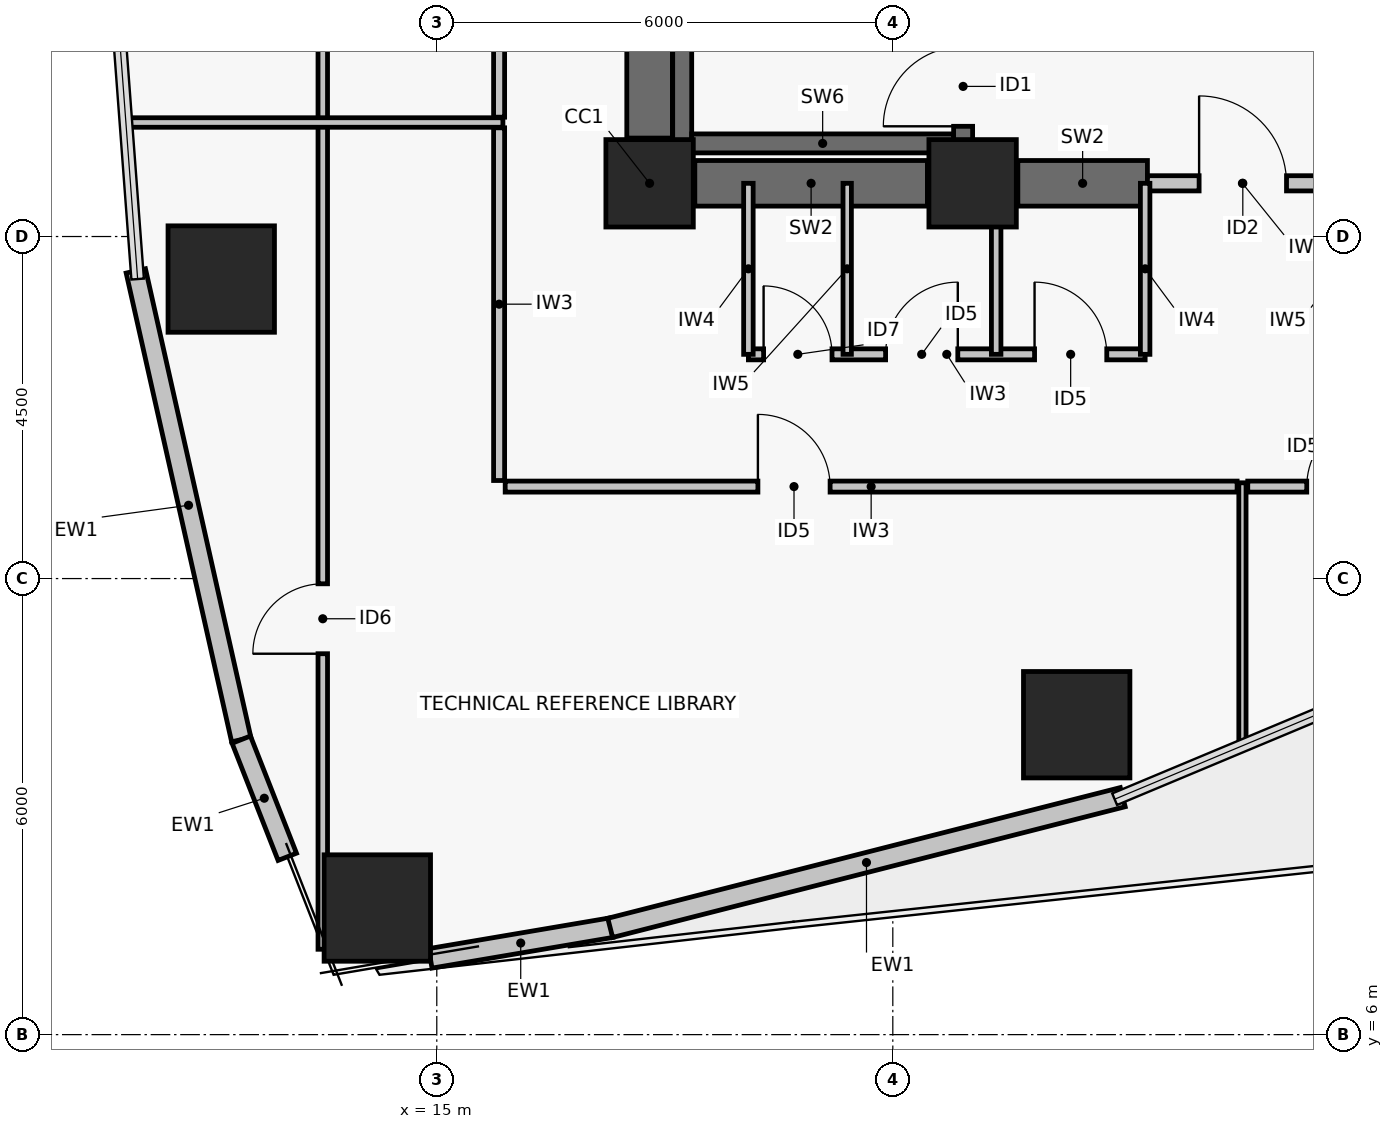
"""IFC4 building model, lengths in metres.
Left out: names, types, materials, properties, quantities, classifications, styles, units other than length and angle.
Written with IfcOpenShell. Run it as: python <this file> out.ifc"""

import sys

from ifc_helpers import new_model, si_unit, direction, frame, frame_2d, origin, origin_2d, place, context, subcontext, project, spatial, rectangle, hollow_rectangle, extrude, element, fill, save


model = new_model("IFC4")
c1 = context("Model", 3, precision=1e-05, world=origin(), true_north=direction((0.0, 1.0)))
c2 = subcontext(c1, "Body", "Model", "MODEL_VIEW")
j1 = project(units=[si_unit("LENGTHUNIT", "METRE"), si_unit("PLANEANGLEUNIT", "RADIAN")], contexts=[c1])
p1 = place(None, origin())
s1 = spatial("IfcSite", under=j1, at=p1, CompositionType="ELEMENT")
p2 = place(p1, origin())
s2 = spatial("IfcBuilding", under=s1, at=p2, CompositionType="ELEMENT")
p3 = place(p2, frame((0.0, 0.0, 68.52)))
s3 = spatial("IfcBuildingStorey", under=s2, at=p3, CompositionType="ELEMENT", Elevation=68.52)
for number, where, z_axis, x_axis in (
    (1, (17.8, 17.2, 0.0), (0.0, 0.0, 1.0), (1.0, 0.0, 0.0)),
    (2, (22.05, 17.2, 0.0), (0.0, 0.0, 1.0), (1.0, 0.0, 0.0)),
):
    element("IfcColumn", number, at=place(p3, frame(where, z_axis=z_axis, x_axis=x_axis)), inside=s3, PredefinedType="COLUMN", context=c2, shape_type="SweptSolid", body=[
        extrude(rectangle(XDim=1.15, YDim=1.15, at=origin_2d()), origin(), (0.0, 0.0, 1.0), 3.72),
    ])
p4 = place(p3, frame((18.395, 17.2, 0.0), z_axis=(0.0, 0.0, 1.0), x_axis=(1.0, 0.0, 0.0)))
e3 = element("IfcWall", 3, at=p4, inside=s3, PredefinedType="SHEAR", context=c2, shape_type="SweptSolid", body=[
    extrude(rectangle(XDim=3.06, YDim=0.6, at=frame_2d((1.53, 0.0))), origin(), (0.0, 0.0, 1.0), 3.47),
])
p5 = place(p3, frame((22.645, 17.2, 0.0), z_axis=(0.0, 0.0, 1.0), x_axis=(1.0, 0.0, 0.0)))
e4 = element("IfcWall", 4, at=p5, inside=s3, PredefinedType="SHEAR", context=c2, shape_type="SweptSolid", body=[
    extrude(rectangle(XDim=1.705, YDim=0.6, at=frame_2d((0.853, 0.0))), origin(), (0.0, 0.0, 1.0), 3.47),
])
p6 = place(p3, frame((17.8, 17.795, 0.0), z_axis=(0.0, 0.0, 1.0), x_axis=(0.0, 1.0, 0.0)))
e5 = element("IfcWall", 5, at=p6, inside=s3, PredefinedType="SHEAR", context=c2, shape_type="SweptSolid", body=[
    extrude(rectangle(XDim=8.41, YDim=0.6, at=frame_2d((4.205, 0.0))), origin(), (0.0, 0.0, 1.0), 3.47),
])
p7 = place(p3, frame((18.229, 17.6, 0.0), z_axis=(0.0, 0.0, 1.0), x_axis=(0.0, 1.0, 0.0)))
e6 = element("IfcWall", 6, at=p7, inside=s3, PredefinedType="SHEAR", context=c2, shape_type="SweptSolid", body=[
    extrude(rectangle(XDim=8.8, YDim=0.25, at=frame_2d((4.4, 0.0))), origin(), (0.0, 0.0, 1.0), 3.47),
])
p8 = place(p3, frame((21.925, 17.6, 0.0), z_axis=(0.0, 0.0, 1.0), x_axis=(0.0, 1.0, 0.0)))
e7 = element("IfcWall", 7, at=p8, inside=s3, PredefinedType="SHEAR", context=c2, shape_type="SweptSolid", body=[
    extrude(rectangle(XDim=8.8, YDim=0.25, at=frame_2d((4.4, 0.0))), origin(), (0.0, 0.0, 1.0), 3.47),
])
p9 = place(p8, frame((0.35, 0.0, 0.0)))
e8 = element("IfcOpeningElement", 8, at=p9, cuts=e7, PredefinedType="OPENING", context=c2, shape_type="SweptSolid", body=[
    extrude(rectangle(XDim=1.05, YDim=2.08, at=frame_2d((0.525, 1.04))), frame((0.0, 0.135, 0.0), z_axis=(0.0, -1.0, 0.0), x_axis=(1.0, 0.0, 0.0)), (0.0, 0.0, 1.0), 0.27),
])
p10 = place(p3, frame((18.354, 17.725, 0.0), z_axis=(0.0, 0.0, 1.0), x_axis=(1.0, 0.0, 0.0)))
e9 = element("IfcWall", 9, at=p10, inside=s3, PredefinedType="SHEAR", context=c2, shape_type="SweptSolid", body=[
    extrude(rectangle(XDim=3.446, YDim=0.25, at=frame_2d((1.723, 0.0))), origin(), (0.0, 0.0, 1.0), 3.47),
])
for number, where, z_axis, x_axis in (
    (10, (12.164, 15.94, 0.0), (0.0, 0.0, 1.0), (1.0, 0.0, 0.0)),
    (11, (14.218, 7.666, 0.0), (0.0, 0.0, 1.0), (1.0, 0.0, 0.0)),
    (12, (23.419, 10.077, 0.0), (0.0, 0.0, 1.0), (1.0, 0.0, 0.0)),
):
    element("IfcColumn", number, at=place(p3, frame(where, z_axis=z_axis, x_axis=x_axis)), inside=s3, PredefinedType="COLUMN", context=c2, shape_type="SweptSolid", body=[
        extrude(hollow_rectangle(XDim=1.4, YDim=1.4, WallThickness=0.055, at=origin_2d()), origin(), (0.0, 0.0, 1.0), 3.72),
    ])
p11 = place(p3, frame((12.427, 9.881, 0.0), z_axis=(0.0, 0.0, 1.0), x_axis=(-0.219502085231, 0.975612030768, 0.0)))
e13 = element("IfcWall", 13, at=p11, inside=s3, PredefinedType="PARTITIONING", context=c2, shape_type="SweptSolid", body=[
    extrude(rectangle(XDim=6.321, YDim=0.26, at=frame_2d((3.16, 0.0))), origin(), (0.0, 0.0, 1.0), 3.47),
])
p12 = place(p3, frame((13.033, 8.339, 0.0), z_axis=(0.0, 0.0, 1.0), x_axis=(-0.365666052462, 0.930746119023, 0.0)))
e14 = element("IfcWall", 14, at=p12, inside=s3, PredefinedType="PARTITIONING", context=c2, shape_type="SweptSolid", body=[
    extrude(rectangle(XDim=1.656, YDim=0.26, at=frame_2d((0.828, 0.0))), origin(), (0.0, 0.0, 1.0), 3.47),
])
p13 = place(p3, frame((17.293, 7.407, 0.0), z_axis=(0.0, 0.0, 1.0), x_axis=(-0.985905469923, -0.167303330437, 0.0)))
e15 = element("IfcWall", 15, at=p13, inside=s3, PredefinedType="PARTITIONING", context=c2, shape_type="SweptSolid", body=[
    extrude(rectangle(XDim=2.412, YDim=0.26, at=frame_2d((1.206, 0.0))), origin(), (0.0, 0.0, 1.0), 3.47),
])
p14 = place(p3, frame((24.025, 9.124, 0.0), z_axis=(0.0, 0.0, 1.0), x_axis=(-0.968977974408, -0.247147092057, 0.0)))
e16 = element("IfcWall", 16, at=p14, inside=s3, PredefinedType="PARTITIONING", context=c2, shape_type="SweptSolid", body=[
    extrude(rectangle(XDim=6.959, YDim=0.26, at=frame_2d((3.479, 0.0))), origin(), (0.0, 0.0, 1.0), 3.47),
])
p15 = place(p3, frame((24.35, 17.2, 0.0), z_axis=(0.0, 0.0, 1.0), x_axis=(1.0, 0.0, 0.0)))
e17 = element("IfcWall", 17, at=p15, inside=s3, PredefinedType="PARTITIONING", context=c2, shape_type="SweptSolid", body=[
    extrude(rectangle(XDim=2.5, YDim=0.2, at=frame_2d((1.25, 0.0))), origin(), (0.0, 0.0, 1.0), 2.6),
])
p16 = place(p15, frame((0.68, 0.0, 0.0)))
e18 = element("IfcOpeningElement", 18, at=p16, cuts=e17, PredefinedType="OPENING", context=c2, shape_type="SweptSolid", body=[
    extrude(rectangle(XDim=1.15, YDim=2.08, at=frame_2d((0.575, 1.04))), frame((0.0, 0.11, 0.0), z_axis=(0.0, -1.0, 0.0), x_axis=(1.0, 0.0, 0.0)), (0.0, 0.0, 1.0), 0.22),
])
p17 = place(p3, frame((19.1, 14.95, 0.0), z_axis=(0.0, 0.0, 1.0), x_axis=(1.0, 0.0, 0.0)))
e19 = element("IfcWall", 19, at=p17, inside=s3, PredefinedType="PARTITIONING", context=c2, shape_type="SweptSolid", body=[
    extrude(rectangle(XDim=5.22, YDim=0.145, at=frame_2d((2.61, 0.0))), origin(), (0.0, 0.0, 1.0), 2.2),
])
p18 = place(p17, frame((0.2, 0.0, 0.0)))
e20 = element("IfcOpeningElement", 20, at=p18, cuts=e19, PredefinedType="OPENING", context=c2, shape_type="SweptSolid", body=[
    extrude(rectangle(XDim=0.9, YDim=2.02, at=frame_2d((0.45, 1.01))), frame((0.0, 0.083, 0.0), z_axis=(0.0, -1.0, 0.0), x_axis=(1.0, 0.0, 0.0)), (0.0, 0.0, 1.0), 0.165),
])
p19 = place(p17, frame((1.805, 0.0, 0.0)))
e21 = element("IfcOpeningElement", 21, at=p19, cuts=e19, PredefinedType="OPENING", context=c2, shape_type="SweptSolid", body=[
    extrude(rectangle(XDim=0.95, YDim=2.06, at=frame_2d((0.475, 1.03))), frame((0.0, 0.083, 0.0), z_axis=(0.0, -1.0, 0.0), x_axis=(1.0, 0.0, 0.0)), (0.0, 0.0, 1.0), 0.165),
])
p20 = place(p17, frame((3.765, 0.0, 0.0)))
e22 = element("IfcOpeningElement", 22, at=p20, cuts=e19, PredefinedType="OPENING", context=c2, shape_type="SweptSolid", body=[
    extrude(rectangle(XDim=0.95, YDim=2.06, at=frame_2d((0.475, 1.03))), frame((0.0, 0.083, 0.0), z_axis=(0.0, -1.0, 0.0), x_axis=(1.0, 0.0, 0.0)), (0.0, 0.0, 1.0), 0.165),
])
p21 = place(p3, frame((19.1, 14.95, 0.0), z_axis=(0.0, 0.0, 1.0), x_axis=(0.0, 1.0, 0.0)))
e23 = element("IfcWall", 23, at=p21, inside=s3, PredefinedType="PARTITIONING", context=c2, shape_type="SweptSolid", body=[
    extrude(rectangle(XDim=2.25, YDim=0.125, at=frame_2d((1.125, 0.0))), origin(), (0.0, 0.0, 1.0), 2.6),
])
p22 = place(p3, frame((20.4, 14.95, 0.0), z_axis=(0.0, 0.0, 1.0), x_axis=(0.0, 1.0, 0.0)))
e24 = element("IfcWall", 24, at=p22, inside=s3, PredefinedType="PARTITIONING", context=c2, shape_type="SweptSolid", body=[
    extrude(rectangle(XDim=2.25, YDim=0.11, at=frame_2d((1.125, 0.0))), origin(), (0.0, 0.0, 1.0), 2.6),
])
p23 = place(p3, frame((22.36, 14.95, 0.0), z_axis=(0.0, 0.0, 1.0), x_axis=(0.0, 1.0, 0.0)))
e25 = element("IfcWall", 25, at=p23, inside=s3, PredefinedType="PARTITIONING", context=c2, shape_type="SweptSolid", body=[
    extrude(rectangle(XDim=2.25, YDim=0.125, at=frame_2d((1.125, 0.0))), origin(), (0.0, 0.0, 1.0), 2.2),
])
p24 = place(p3, frame((24.32, 14.95, 0.0), z_axis=(0.0, 0.0, 1.0), x_axis=(0.0, 1.0, 0.0)))
e26 = element("IfcWall", 26, at=p24, inside=s3, PredefinedType="PARTITIONING", context=c2, shape_type="SweptSolid", body=[
    extrude(rectangle(XDim=2.25, YDim=0.125, at=frame_2d((1.125, 0.0))), origin(), (0.0, 0.0, 1.0), 2.6),
])
p25 = place(p3, frame((15.82, 17.93, 0.0), z_axis=(0.0, 0.0, 1.0), x_axis=(0.0, -1.0, 0.0)))
e27 = element("IfcWall", 27, at=p25, inside=s3, PredefinedType="PARTITIONING", context=c2, shape_type="SweptSolid", body=[
    extrude(rectangle(XDim=4.64, YDim=0.145, at=frame_2d((2.32, 0.0))), origin(), (0.0, 0.0, 1.0), 2.2),
])
p26 = place(p3, frame((15.9, 13.21, 0.0), z_axis=(0.0, 0.0, 1.0), x_axis=(1.0, 0.0, 0.0)))
e28 = element("IfcWall", 28, at=p26, inside=s3, PredefinedType="PARTITIONING", context=c2, shape_type="SweptSolid", body=[
    extrude(rectangle(XDim=9.63, YDim=0.145, at=frame_2d((4.815, 0.0))), origin(), (0.0, 0.0, 1.0), 2.2),
])
p27 = place(p26, frame((3.325, 0.0, 0.0)))
e29 = element("IfcOpeningElement", 29, at=p27, cuts=e28, PredefinedType="OPENING", context=c2, shape_type="SweptSolid", body=[
    extrude(rectangle(XDim=0.95, YDim=2.06, at=frame_2d((0.475, 1.03))), frame((0.0, 0.083, 0.0), z_axis=(0.0, -1.0, 0.0), x_axis=(1.0, 0.0, 0.0)), (0.0, 0.0, 1.0), 0.165),
])
p28 = place(p3, frame((25.67, 13.21, 0.0), z_axis=(0.0, 0.0, 1.0), x_axis=(1.0, 0.0, 0.0)))
e30 = element("IfcWall", 30, at=p28, inside=s3, PredefinedType="PARTITIONING", context=c2, shape_type="SweptSolid", body=[
    extrude(rectangle(XDim=5.48, YDim=0.145, at=frame_2d((2.74, 0.0))), origin(), (0.0, 0.0, 1.0), 2.85),
])
p29 = place(p28, frame((0.776, 0.0, 0.0)))
e31 = element("IfcOpeningElement", 31, at=p29, cuts=e30, PredefinedType="OPENING", context=c2, shape_type="SweptSolid", body=[
    extrude(rectangle(XDim=0.95, YDim=2.06, at=frame_2d((0.475, 1.03))), frame((0.0, 0.083, 0.0), z_axis=(0.0, -1.0, 0.0), x_axis=(1.0, 0.0, 0.0)), (0.0, 0.0, 1.0), 0.165),
])
p30 = place(p3, frame((15.82, 25.93, 0.0), z_axis=(0.0, 0.0, 1.0), x_axis=(0.0, -1.0, 0.0)))
e32 = element("IfcWall", 32, at=p30, inside=s3, PredefinedType="PARTITIONING", context=c2, shape_type="SweptSolid", body=[
    extrude(rectangle(XDim=7.86, YDim=0.145, at=frame_2d((3.93, 0.0))), origin(), (0.0, 0.0, 1.0), 3.47),
])
p31 = place(p30, frame((3.455, 0.0, 0.0)))
e33 = element("IfcOpeningElement", 33, at=p31, cuts=e32, PredefinedType="OPENING", context=c2, shape_type="SweptSolid", body=[
    extrude(rectangle(XDim=0.95, YDim=2.06, at=frame_2d((0.475, 1.03))), frame((0.0, 0.083, 0.0), z_axis=(0.0, -1.0, 0.0), x_axis=(1.0, 0.0, 0.0)), (0.0, 0.0, 1.0), 0.165),
])
p32 = place(p3, frame((13.5, 7.123, 0.0), z_axis=(0.0, 0.0, 1.0), x_axis=(0.0, 1.0, 0.0)))
e34 = element("IfcWall", 34, at=p32, inside=s3, PredefinedType="PARTITIONING", context=c2, shape_type="SweptSolid", body=[
    extrude(rectangle(XDim=29.754, YDim=0.125, at=frame_2d((14.877, 0.0))), origin(), (0.0, 0.0, 1.0), 2.2),
])
p33 = place(p32, frame((3.888, 0.0, 0.0)))
e35 = element("IfcOpeningElement", 35, at=p33, cuts=e34, PredefinedType="OPENING", context=c2, shape_type="SweptSolid", body=[
    extrude(rectangle(XDim=0.92, YDim=2.05, at=frame_2d((0.46, 1.025))), frame((0.0, 0.073, 0.0), z_axis=(0.0, -1.0, 0.0), x_axis=(1.0, 0.0, 0.0)), (0.0, 0.0, 1.0), 0.145),
])
p34 = place(p32, frame((24.946, 0.0, 0.0)))
e36 = element("IfcOpeningElement", 36, at=p34, cuts=e34, PredefinedType="OPENING", context=c2, shape_type="SweptSolid", body=[
    extrude(rectangle(XDim=0.92, YDim=2.05, at=frame_2d((0.46, 1.025))), frame((0.0, 0.073, 0.0), z_axis=(0.0, -1.0, 0.0), x_axis=(1.0, 0.0, 0.0)), (0.0, 0.0, 1.0), 0.145),
])
p35 = place(p32, frame((14.417, 0.0, 0.0)))
e37 = element("IfcOpeningElement", 37, at=p35, cuts=e34, PredefinedType="OPENING", context=c2, shape_type="SweptSolid", body=[
    extrude(rectangle(XDim=0.92, YDim=2.05, at=frame_2d((0.46, 1.025))), frame((0.0, 0.073, 0.0), z_axis=(0.0, -1.0, 0.0), x_axis=(1.0, 0.0, 0.0)), (0.0, 0.0, 1.0), 0.145),
])
p36 = place(p3, frame((25.6, 9.79, 0.0), z_axis=(0.0, 0.0, 1.0), x_axis=(0.0, 1.0, 0.0)))
e38 = element("IfcWall", 38, at=p36, inside=s3, PredefinedType="PARTITIONING", context=c2, shape_type="SweptSolid", body=[
    extrude(rectangle(XDim=3.47, YDim=0.095, at=frame_2d((1.735, 0.0))), origin(), (0.0, 0.0, 1.0), 2.85),
])
p37 = place(p3, frame((10.9, 18.0, 0.0), z_axis=(0.0, 0.0, 1.0), x_axis=(1.0, 0.0, 0.0)))
e39 = element("IfcWall", 39, at=p37, inside=s3, PredefinedType="PARTITIONING", context=c2, shape_type="SweptSolid", body=[
    extrude(rectangle(XDim=4.97, YDim=0.125, at=frame_2d((2.485, 0.0))), origin(), (0.0, 0.0, 1.0), 2.85),
])
p38 = place(p9, origin())
e40 = element("IfcDoor", 40, at=p38, inside=s3, OperationType="SINGLE_SWING_LEFT", PredefinedType="DOOR", context=c2, shape_type="SweptSolid", body=[
    extrude(rectangle(XDim=1.05, YDim=2.08, at=frame_2d((0.525, 1.04))), frame((0.0, 0.025, 0.0), z_axis=(0.0, -1.0, 0.0), x_axis=(1.0, 0.0, 0.0)), (0.0, 0.0, 1.0), 0.05),
])
fill(e8, e40)
p39 = place(p16, origin())
e41 = element("IfcDoor", 41, at=p39, inside=s3, OperationType="SINGLE_SWING_LEFT", PredefinedType="DOOR", context=c2, shape_type="SweptSolid", body=[
    extrude(rectangle(XDim=1.15, YDim=2.08, at=frame_2d((0.575, 1.04))), frame((0.0, 0.025, 0.0), z_axis=(0.0, -1.0, 0.0), x_axis=(1.0, 0.0, 0.0)), (0.0, 0.0, 1.0), 0.05),
])
fill(e18, e41)
p40 = place(p18, origin())
e42 = element("IfcDoor", 42, at=p40, inside=s3, OperationType="SINGLE_SWING_LEFT", PredefinedType="DOOR", context=c2, shape_type="SweptSolid", body=[
    extrude(rectangle(XDim=0.9, YDim=2.02, at=frame_2d((0.45, 1.01))), frame((0.0, 0.025, 0.0), z_axis=(0.0, -1.0, 0.0), x_axis=(1.0, 0.0, 0.0)), (0.0, 0.0, 1.0), 0.05),
])
fill(e20, e42)
p41 = place(p19, origin())
e43 = element("IfcDoor", 43, at=p41, inside=s3, OperationType="SINGLE_SWING_RIGHT", PredefinedType="DOOR", context=c2, shape_type="SweptSolid", body=[
    extrude(rectangle(XDim=0.95, YDim=2.06, at=frame_2d((0.475, 1.03))), frame((0.0, 0.025, 0.0), z_axis=(0.0, -1.0, 0.0), x_axis=(1.0, 0.0, 0.0)), (0.0, 0.0, 1.0), 0.05),
])
fill(e21, e43)
p42 = place(p20, origin())
e44 = element("IfcDoor", 44, at=p42, inside=s3, OperationType="SINGLE_SWING_LEFT", PredefinedType="DOOR", context=c2, shape_type="SweptSolid", body=[
    extrude(rectangle(XDim=0.95, YDim=2.06, at=frame_2d((0.475, 1.03))), frame((0.0, 0.025, 0.0), z_axis=(0.0, -1.0, 0.0), x_axis=(1.0, 0.0, 0.0)), (0.0, 0.0, 1.0), 0.05),
])
fill(e22, e44)
p43 = place(p27, origin())
e45 = element("IfcDoor", 45, at=p43, inside=s3, OperationType="SINGLE_SWING_LEFT", PredefinedType="DOOR", context=c2, shape_type="SweptSolid", body=[
    extrude(rectangle(XDim=0.95, YDim=2.06, at=frame_2d((0.475, 1.03))), frame((0.0, 0.025, 0.0), z_axis=(0.0, -1.0, 0.0), x_axis=(1.0, 0.0, 0.0)), (0.0, 0.0, 1.0), 0.05),
])
fill(e29, e45)
p44 = place(p29, origin())
e46 = element("IfcDoor", 46, at=p44, inside=s3, OperationType="SINGLE_SWING_RIGHT", PredefinedType="DOOR", context=c2, shape_type="SweptSolid", body=[
    extrude(rectangle(XDim=0.95, YDim=2.06, at=frame_2d((0.475, 1.03))), frame((0.0, 0.025, 0.0), z_axis=(0.0, -1.0, 0.0), x_axis=(1.0, 0.0, 0.0)), (0.0, 0.0, 1.0), 0.05),
])
fill(e31, e46)
p45 = place(p33, origin())
e47 = element("IfcDoor", 47, at=p45, inside=s3, OperationType="SINGLE_SWING_LEFT", PredefinedType="DOOR", context=c2, shape_type="SweptSolid", body=[
    extrude(rectangle(XDim=0.92, YDim=2.05, at=frame_2d((0.46, 1.025))), frame((0.0, 0.025, 0.0), z_axis=(0.0, -1.0, 0.0), x_axis=(1.0, 0.0, 0.0)), (0.0, 0.0, 1.0), 0.05),
])
fill(e35, e47)
save(model, sys.argv[1])
